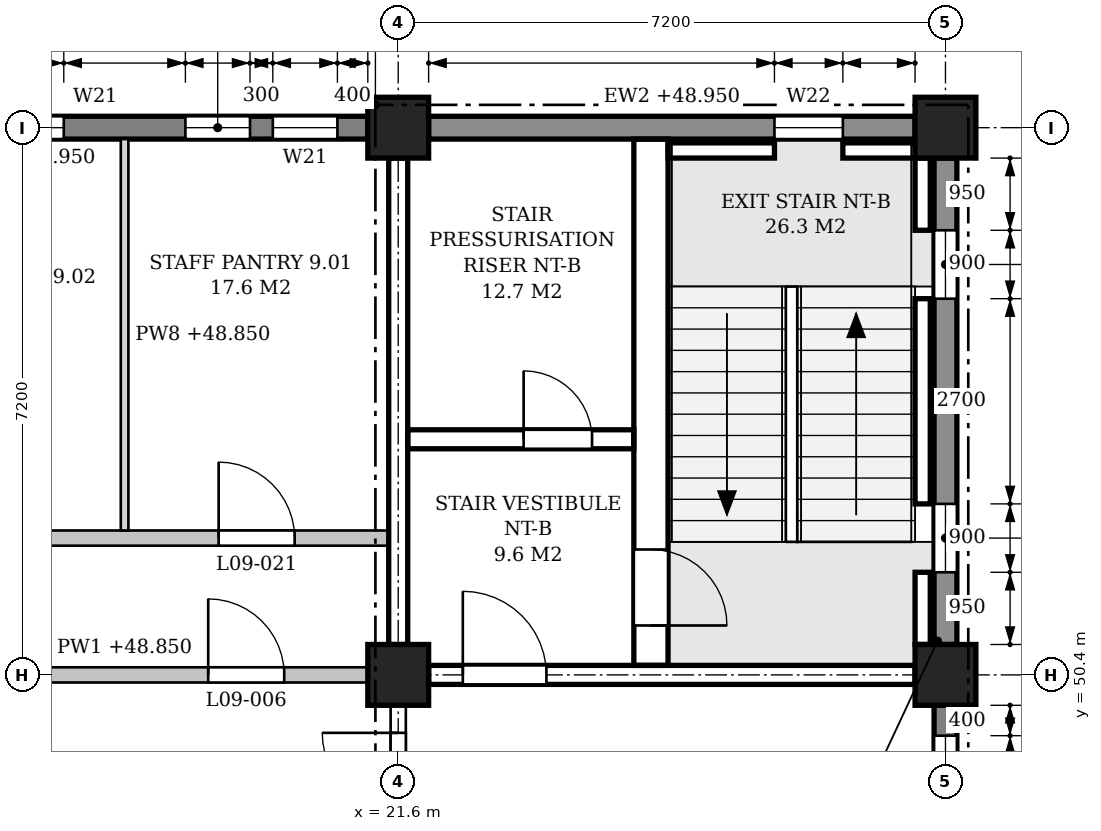
"""IFC4 building model, lengths in metres.
Left out: names, types, materials, properties, quantities, classifications, styles, units other than length and angle.
Written with IfcOpenShell. Run it as: python <this file> out.ifc"""

import sys

from ifc_helpers import new_model, si_unit, direction, frame, frame_2d, origin, origin_2d, place, context, subcontext, project, spatial, polyline, rectangle, outline, extrude, element, fill, save


model = new_model("IFC4")
c1 = context("Model", 3, precision=1e-05, world=origin(), true_north=direction((0.0, 1.0)))
c2 = subcontext(c1, "Body", "Model", "MODEL_VIEW")
j1 = project(units=[si_unit("LENGTHUNIT", "METRE"), si_unit("PLANEANGLEUNIT", "RADIAN")], contexts=[c1])
p1 = place(None, origin())
s1 = spatial("IfcSite", under=j1, at=p1, CompositionType="ELEMENT")
p2 = place(p1, origin())
s2 = spatial("IfcBuilding", under=s1, at=p2, CompositionType="ELEMENT")
p3 = place(p2, frame((0.0, 0.0, 45.3)))
s3 = spatial("IfcBuildingStorey", under=s2, at=p3, CompositionType="ELEMENT", Elevation=45.3)
for number, where, z_axis, x_axis in (
    (1, (21.6, 50.4, 0.0), (0.0, 0.0, 1.0), (1.0, 0.0, 0.0)),
    (2, (21.6, 57.6, 0.0), (0.0, 0.0, 1.0), (1.0, 0.0, 0.0)),
    (3, (28.8, 50.4, 0.0), (0.0, 0.0, 1.0), (1.0, 0.0, 0.0)),
    (4, (28.8, 57.6, 0.0), (0.0, 0.0, 1.0), (1.0, 0.0, 0.0)),
):
    element("IfcColumn", number, at=place(p3, frame(where, z_axis=z_axis, x_axis=x_axis)), inside=s3, PredefinedType="COLUMN", context=c2, shape_type="SweptSolid", body=[
        extrude(rectangle(XDim=0.8, YDim=0.8, at=origin_2d()), origin(), (0.0, 0.0, 1.0), 4.5),
    ])
p4 = place(p3, frame((28.4, 57.6, 0.0), z_axis=(0.0, 0.0, 1.0), x_axis=(-1.0, 0.0, 0.0)))
e5 = element("IfcWall", 5, at=p4, inside=s3, PredefinedType="STANDARD", context=c2, shape_type="SweptSolid", body=[
    extrude(rectangle(XDim=6.4, YDim=0.3, at=frame_2d((3.2, 0.0))), origin(), (0.0, 0.0, 1.0), 3.65),
])
p5 = place(p4, frame((0.95, 0.0, 0.9)))
e6 = element("IfcOpeningElement", 6, at=p5, cuts=e5, PredefinedType="OPENING", context=c2, shape_type="SweptSolid", body=[
    extrude(outline(polyline([(0.0, 0.0), (0.9, 0.0), (0.9, 2.25), (0.45, 2.7), (0.0, 2.25), (0.0, 0.0)])), frame((0.0, 0.16, 0.0), z_axis=(0.0, -1.0, 0.0), x_axis=(1.0, 0.0, 0.0)), (0.0, 0.0, 1.0), 0.32),
])
p6 = place(p3, frame((21.2, 57.6, 0.0), z_axis=(0.0, 0.0, 1.0), x_axis=(-1.0, 0.0, 0.0)))
e7 = element("IfcWall", 7, at=p6, inside=s3, PredefinedType="STANDARD", context=c2, shape_type="SweptSolid", body=[
    extrude(rectangle(XDim=6.4, YDim=0.3, at=frame_2d((3.2, 0.0))), origin(), (0.0, 0.0, 1.0), 3.65),
])
p7 = place(p6, frame((0.4, 0.0, 0.9)))
e8 = element("IfcOpeningElement", 8, at=p7, cuts=e7, PredefinedType="OPENING", context=c2, shape_type="SweptSolid", body=[
    extrude(outline(polyline([(0.0, 0.0), (0.85, 0.0), (0.85, 2.25), (0.425, 2.7), (0.0, 2.25), (0.0, 0.0)])), frame((0.0, 0.16, 0.0), z_axis=(0.0, -1.0, 0.0), x_axis=(1.0, 0.0, 0.0)), (0.0, 0.0, 1.0), 0.32),
])
p8 = place(p6, frame((1.55, 0.0, 0.9)))
e9 = element("IfcOpeningElement", 9, at=p8, cuts=e7, PredefinedType="OPENING", context=c2, shape_type="SweptSolid", body=[
    extrude(outline(polyline([(0.0, 0.0), (0.85, 0.0), (0.85, 2.25), (0.425, 2.7), (0.0, 2.25), (0.0, 0.0)])), frame((0.0, 0.16, 0.0), z_axis=(0.0, -1.0, 0.0), x_axis=(1.0, 0.0, 0.0)), (0.0, 0.0, 1.0), 0.32),
])
p9 = place(p6, frame((4.0, 0.0, 0.9)))
e10 = element("IfcOpeningElement", 10, at=p9, cuts=e7, PredefinedType="OPENING", context=c2, shape_type="SweptSolid", body=[
    extrude(outline(polyline([(0.0, 0.0), (0.85, 0.0), (0.85, 2.25), (0.425, 2.7), (0.0, 2.25), (0.0, 0.0)])), frame((0.0, 0.16, 0.0), z_axis=(0.0, -1.0, 0.0), x_axis=(1.0, 0.0, 0.0)), (0.0, 0.0, 1.0), 0.32),
])
p10 = place(p6, frame((5.15, 0.0, 0.9)))
e11 = element("IfcOpeningElement", 11, at=p10, cuts=e7, PredefinedType="OPENING", context=c2, shape_type="SweptSolid", body=[
    extrude(outline(polyline([(0.0, 0.0), (0.85, 0.0), (0.85, 2.25), (0.425, 2.7), (0.0, 2.25), (0.0, 0.0)])), frame((0.0, 0.16, 0.0), z_axis=(0.0, -1.0, 0.0), x_axis=(1.0, 0.0, 0.0)), (0.0, 0.0, 1.0), 0.32),
])
p11 = place(p3, frame((28.8, 43.6, 0.0), z_axis=(0.0, 0.0, 1.0), x_axis=(0.0, 1.0, 0.0)))
e12 = element("IfcWall", 12, at=p11, inside=s3, PredefinedType="STANDARD", context=c2, shape_type="SweptSolid", body=[
    extrude(rectangle(XDim=6.4, YDim=0.3, at=frame_2d((3.2, 0.0))), origin(), (0.0, 0.0, 1.0), 3.65),
])
p12 = place(p11, frame((4.0, 0.0, 0.9)))
e13 = element("IfcOpeningElement", 13, at=p12, cuts=e12, PredefinedType="OPENING", context=c2, shape_type="SweptSolid", body=[
    extrude(outline(polyline([(0.0, 0.0), (0.85, 0.0), (0.85, 2.25), (0.425, 2.7), (0.0, 2.25), (0.0, 0.0)])), frame((0.0, 0.16, 0.0), z_axis=(0.0, -1.0, 0.0), x_axis=(1.0, 0.0, 0.0)), (0.0, 0.0, 1.0), 0.32),
])
p13 = place(p11, frame((5.15, 0.0, 0.9)))
e14 = element("IfcOpeningElement", 14, at=p13, cuts=e12, PredefinedType="OPENING", context=c2, shape_type="SweptSolid", body=[
    extrude(outline(polyline([(0.0, 0.0), (0.85, 0.0), (0.85, 2.25), (0.425, 2.7), (0.0, 2.25), (0.0, 0.0)])), frame((0.0, 0.16, 0.0), z_axis=(0.0, -1.0, 0.0), x_axis=(1.0, 0.0, 0.0)), (0.0, 0.0, 1.0), 0.32),
])
p14 = place(p3, frame((28.8, 50.8, 0.0), z_axis=(0.0, 0.0, 1.0), x_axis=(0.0, 1.0, 0.0)))
e15 = element("IfcWall", 15, at=p14, inside=s3, PredefinedType="STANDARD", context=c2, shape_type="SweptSolid", body=[
    extrude(rectangle(XDim=6.4, YDim=0.3, at=frame_2d((3.2, 0.0))), origin(), (0.0, 0.0, 1.0), 3.65),
])
p15 = place(p14, frame((0.95, 0.0, 0.9)))
e16 = element("IfcOpeningElement", 16, at=p15, cuts=e15, PredefinedType="OPENING", context=c2, shape_type="SweptSolid", body=[
    extrude(outline(polyline([(0.0, 0.0), (0.9, 0.0), (0.9, 2.25), (0.45, 2.7), (0.0, 2.25), (0.0, 0.0)])), frame((0.0, 0.16, 0.0), z_axis=(0.0, -1.0, 0.0), x_axis=(1.0, 0.0, 0.0)), (0.0, 0.0, 1.0), 0.32),
])
p16 = place(p14, frame((4.55, 0.0, 0.9)))
e17 = element("IfcOpeningElement", 17, at=p16, cuts=e15, PredefinedType="OPENING", context=c2, shape_type="SweptSolid", body=[
    extrude(outline(polyline([(0.0, 0.0), (0.9, 0.0), (0.9, 2.25), (0.45, 2.7), (0.0, 2.25), (0.0, 0.0)])), frame((0.0, 0.16, 0.0), z_axis=(0.0, -1.0, 0.0), x_axis=(1.0, 0.0, 0.0)), (0.0, 0.0, 1.0), 0.32),
])
p17 = place(p3, frame((22.0, 50.4, 0.0), z_axis=(0.0, 0.0, 1.0), x_axis=(1.0, 0.0, 0.0)))
e18 = element("IfcWall", 18, at=p17, inside=s3, PredefinedType="SHEAR", context=c2, shape_type="SweptSolid", body=[
    extrude(rectangle(XDim=6.4, YDim=0.25, at=frame_2d((3.2, 0.0))), origin(), (0.0, 0.0, 1.0), 3.55),
])
p18 = place(p17, frame((0.45, 0.0, 0.0)))
e19 = element("IfcOpeningElement", 19, at=p18, cuts=e18, PredefinedType="OPENING", context=c2, shape_type="SweptSolid", body=[
    extrude(rectangle(XDim=1.1, YDim=2.1, at=frame_2d((0.55, 1.05))), frame((0.0, 0.135, 0.0), z_axis=(0.0, -1.0, 0.0), x_axis=(1.0, 0.0, 0.0)), (0.0, 0.0, 1.0), 0.27),
])
p19 = place(p3, frame((21.6, 50.8, 0.0), z_axis=(0.0, 0.0, 1.0), x_axis=(0.0, 1.0, 0.0)))
e20 = element("IfcWall", 20, at=p19, inside=s3, PredefinedType="SHEAR", context=c2, shape_type="SweptSolid", body=[
    extrude(rectangle(XDim=6.4, YDim=0.25, at=frame_2d((3.2, 0.0))), origin(), (0.0, 0.0, 1.0), 3.55),
])
p20 = place(p3, frame((28.5, 50.8, -0.25), z_axis=(0.0, 0.0, 1.0), x_axis=(0.0, 1.0, 0.0)))
e21 = element("IfcWall", 21, at=p20, inside=s3, PredefinedType="SHEAR", context=c2, shape_type="SweptSolid", body=[
    extrude(rectangle(XDim=0.95, YDim=0.2, at=frame_2d((0.475, 0.0))), origin(), (0.0, 0.0, 1.0), 4.5),
])
p21 = place(p3, frame((28.5, 52.65, -0.25), z_axis=(0.0, 0.0, 1.0), x_axis=(0.0, 1.0, 0.0)))
e22 = element("IfcWall", 22, at=p21, inside=s3, PredefinedType="SHEAR", context=c2, shape_type="SweptSolid", body=[
    extrude(rectangle(XDim=2.7, YDim=0.2, at=frame_2d((1.35, 0.0))), origin(), (0.0, 0.0, 1.0), 4.5),
])
p22 = place(p3, frame((28.5, 56.25, -0.25), z_axis=(0.0, 0.0, 1.0), x_axis=(0.0, 1.0, 0.0)))
e23 = element("IfcWall", 23, at=p22, inside=s3, PredefinedType="SHEAR", context=c2, shape_type="SweptSolid", body=[
    extrude(rectangle(XDim=0.95, YDim=0.2, at=frame_2d((0.475, 0.0))), origin(), (0.0, 0.0, 1.0), 4.5),
])
p23 = place(p3, frame((25.15, 57.3, -0.25), z_axis=(0.0, 0.0, 1.0), x_axis=(1.0, 0.0, 0.0)))
e24 = element("IfcWall", 24, at=p23, inside=s3, PredefinedType="SHEAR", context=c2, shape_type="SweptSolid", body=[
    extrude(rectangle(XDim=1.4, YDim=0.2, at=frame_2d((0.7, 0.0))), origin(), (0.0, 0.0, 1.0), 4.5),
])
p24 = place(p3, frame((27.45, 57.3, -0.25), z_axis=(0.0, 0.0, 1.0), x_axis=(1.0, 0.0, 0.0)))
e25 = element("IfcWall", 25, at=p24, inside=s3, PredefinedType="SHEAR", context=c2, shape_type="SweptSolid", body=[
    extrude(rectangle(XDim=0.95, YDim=0.2, at=frame_2d((0.475, 0.0))), origin(), (0.0, 0.0, 1.0), 4.5),
])
p25 = place(p3, frame((24.925, 50.525, 0.0), z_axis=(0.0, 0.0, 1.0), x_axis=(0.0, 1.0, 0.0)))
e26 = element("IfcWall", 26, at=p25, inside=s3, PredefinedType="SHEAR", context=c2, shape_type="SweptSolid", body=[
    extrude(rectangle(XDim=6.925, YDim=0.45, at=frame_2d((3.462, 0.0))), origin(), (0.0, 0.0, 1.0), 4.25),
])
p26 = place(p25, frame((0.525, 0.0, 0.0)))
e27 = element("IfcOpeningElement", 27, at=p26, cuts=e26, PredefinedType="OPENING", context=c2, shape_type="SweptSolid", body=[
    extrude(rectangle(XDim=1.0, YDim=2.1, at=frame_2d((0.5, 1.05))), frame((0.0, 0.235, 0.0), z_axis=(0.0, -1.0, 0.0), x_axis=(1.0, 0.0, 0.0)), (0.0, 0.0, 1.0), 0.47),
])
p27 = place(p3, frame((21.725, 53.5, 0.0), z_axis=(0.0, 0.0, 1.0), x_axis=(1.0, 0.0, 0.0)))
e28 = element("IfcWall", 28, at=p27, inside=s3, PredefinedType="SHEAR", context=c2, shape_type="SweptSolid", body=[
    extrude(rectangle(XDim=2.975, YDim=0.25, at=frame_2d((1.487, 0.0))), origin(), (0.0, 0.0, 1.0), 4.25),
])
p28 = place(p27, frame((1.525, 0.0, 0.0)))
e29 = element("IfcOpeningElement", 29, at=p28, cuts=e28, PredefinedType="OPENING", context=c2, shape_type="SweptSolid", body=[
    extrude(rectangle(XDim=0.9, YDim=2.1, at=frame_2d((0.45, 1.05))), frame((0.0, 0.135, 0.0), z_axis=(0.0, -1.0, 0.0), x_axis=(1.0, 0.0, 0.0)), (0.0, 0.0, 1.0), 0.27),
])
p29 = place(p3, frame((14.8, 50.4, 0.0), z_axis=(0.0, 0.0, 1.0), x_axis=(1.0, 0.0, 0.0)))
e30 = element("IfcWall", 30, at=p29, inside=s3, PredefinedType="PARTITIONING", context=c2, shape_type="SweptSolid", body=[
    extrude(rectangle(XDim=6.4, YDim=0.2, at=frame_2d((3.2, 0.0))), origin(), (0.0, 0.0, 1.0), 3.55),
])
p30 = place(p29, frame((4.3, 0.0, 0.0)))
e31 = element("IfcOpeningElement", 31, at=p30, cuts=e30, PredefinedType="OPENING", context=c2, shape_type="SweptSolid", body=[
    extrude(rectangle(XDim=1.0, YDim=2.1, at=frame_2d((0.5, 1.05))), frame((0.0, 0.11, 0.0), z_axis=(0.0, -1.0, 0.0), x_axis=(1.0, 0.0, 0.0)), (0.0, 0.0, 1.0), 0.22),
])
p31 = place(p3, frame((7.325, 52.2, 0.0), z_axis=(0.0, 0.0, 1.0), x_axis=(1.0, 0.0, 0.0)))
e32 = element("IfcWall", 32, at=p31, inside=s3, PredefinedType="PARTITIONING", context=c2, shape_type="SweptSolid", body=[
    extrude(outline(polyline([(0.0, 0.0), (14.15, 0.0), (14.15, 3.55), (14.05, 3.55), (14.05, 4.25), (7.3, 4.25), (7.3, 3.55), (6.85, 3.55), (6.85, 4.25), (0.1, 4.25), (0.1, 3.55), (0.0, 3.55), (0.0, 0.0)])), frame((0.0, 0.1, 0.0), z_axis=(0.0, -1.0, 0.0), x_axis=(1.0, 0.0, 0.0)), (0.0, 0.0, 1.0), 0.2),
])
p32 = place(p31, frame((1.238, 0.0, 0.0)))
e33 = element("IfcOpeningElement", 33, at=p32, cuts=e32, PredefinedType="OPENING", context=c2, shape_type="SweptSolid", body=[
    extrude(rectangle(XDim=1.0, YDim=2.1, at=frame_2d((0.5, 1.05))), frame((0.0, 0.11, 0.0), z_axis=(0.0, -1.0, 0.0), x_axis=(1.0, 0.0, 0.0)), (0.0, 0.0, 1.0), 0.22),
])
p33 = place(p31, frame((4.775, 0.0, 0.0)))
e34 = element("IfcOpeningElement", 34, at=p33, cuts=e32, PredefinedType="OPENING", context=c2, shape_type="SweptSolid", body=[
    extrude(rectangle(XDim=1.0, YDim=2.1, at=frame_2d((0.5, 1.05))), frame((0.0, 0.11, 0.0), z_axis=(0.0, -1.0, 0.0), x_axis=(1.0, 0.0, 0.0)), (0.0, 0.0, 1.0), 0.22),
])
p34 = place(p31, frame((8.375, 0.0, 0.0)))
e35 = element("IfcOpeningElement", 35, at=p34, cuts=e32, PredefinedType="OPENING", context=c2, shape_type="SweptSolid", body=[
    extrude(rectangle(XDim=1.0, YDim=2.1, at=frame_2d((0.5, 1.05))), frame((0.0, 0.11, 0.0), z_axis=(0.0, -1.0, 0.0), x_axis=(1.0, 0.0, 0.0)), (0.0, 0.0, 1.0), 0.22),
])
p35 = place(p31, frame((11.913, 0.0, 0.0)))
e36 = element("IfcOpeningElement", 36, at=p35, cuts=e32, PredefinedType="OPENING", context=c2, shape_type="SweptSolid", body=[
    extrude(rectangle(XDim=1.0, YDim=2.1, at=frame_2d((0.5, 1.05))), frame((0.0, 0.11, 0.0), z_axis=(0.0, -1.0, 0.0), x_axis=(1.0, 0.0, 0.0)), (0.0, 0.0, 1.0), 0.22),
])
p36 = place(p3, frame((18.0, 52.3, 0.0), z_axis=(0.0, 0.0, 1.0), x_axis=(0.0, 1.0, 0.0)))
e37 = element("IfcWall", 37, at=p36, inside=s3, PredefinedType="PARTITIONING", context=c2, shape_type="SweptSolid", body=[
    extrude(rectangle(XDim=5.15, YDim=0.1, at=frame_2d((2.575, 0.0))), origin(), (0.0, 0.0, 1.0), 3.55),
])
p37 = place(p3, frame((21.6, 47.275, 0.0), z_axis=(0.0, 0.0, 1.0), x_axis=(0.0, 1.0, 0.0)))
e38 = element("IfcWall", 38, at=p37, inside=s3, PredefinedType="PARTITIONING", context=c2, shape_type="SweptSolid", body=[
    extrude(rectangle(XDim=2.725, YDim=0.2, at=frame_2d((1.363, 0.0))), origin(), (0.0, 0.0, 1.0), 3.55),
])
p38 = place(p37, frame((0.363, 0.0, 0.0)))
e39 = element("IfcOpeningElement", 39, at=p38, cuts=e38, PredefinedType="OPENING", context=c2, shape_type="SweptSolid", body=[
    extrude(rectangle(XDim=2.0, YDim=2.4, at=frame_2d((1.0, 1.2))), frame((0.0, 0.11, 0.0), z_axis=(0.0, -1.0, 0.0), x_axis=(1.0, 0.0, 0.0)), (0.0, 0.0, 1.0), 0.22),
])
p39 = place(p13, origin())
e40 = element("IfcWindow", 40, at=p39, inside=s3, PartitioningType="SINGLE_PANEL", PredefinedType="WINDOW", context=c2, shape_type="SweptSolid", body=[
    extrude(outline(polyline([(0.0, 0.0), (0.85, 0.0), (0.85, 2.25), (0.425, 2.7), (0.0, 2.25), (0.0, 0.0)])), frame((0.0, 0.03, 0.0), z_axis=(0.0, -1.0, 0.0), x_axis=(1.0, 0.0, 0.0)), (0.0, 0.0, 1.0), 0.06),
])
fill(e14, e40)
p40 = place(p15, origin())
e41 = element("IfcWindow", 41, at=p40, inside=s3, PartitioningType="SINGLE_PANEL", PredefinedType="WINDOW", context=c2, shape_type="SweptSolid", body=[
    extrude(outline(polyline([(0.0, 0.0), (0.9, 0.0), (0.9, 2.25), (0.45, 2.7), (0.0, 2.25), (0.0, 0.0)])), frame((0.0, 0.03, 0.0), z_axis=(0.0, -1.0, 0.0), x_axis=(1.0, 0.0, 0.0)), (0.0, 0.0, 1.0), 0.06),
])
fill(e16, e41)
p41 = place(p16, origin())
e42 = element("IfcWindow", 42, at=p41, inside=s3, PartitioningType="SINGLE_PANEL", PredefinedType="WINDOW", context=c2, shape_type="SweptSolid", body=[
    extrude(outline(polyline([(0.0, 0.0), (0.9, 0.0), (0.9, 2.25), (0.45, 2.7), (0.0, 2.25), (0.0, 0.0)])), frame((0.0, 0.03, 0.0), z_axis=(0.0, -1.0, 0.0), x_axis=(1.0, 0.0, 0.0)), (0.0, 0.0, 1.0), 0.06),
])
fill(e17, e42)
p42 = place(p5, origin())
e43 = element("IfcWindow", 43, at=p42, inside=s3, PartitioningType="SINGLE_PANEL", PredefinedType="WINDOW", context=c2, shape_type="SweptSolid", body=[
    extrude(outline(polyline([(0.0, 0.0), (0.9, 0.0), (0.9, 2.25), (0.45, 2.7), (0.0, 2.25), (0.0, 0.0)])), frame((0.0, 0.03, 0.0), z_axis=(0.0, -1.0, 0.0), x_axis=(1.0, 0.0, 0.0)), (0.0, 0.0, 1.0), 0.06),
])
fill(e6, e43)
p43 = place(p7, origin())
e44 = element("IfcWindow", 44, at=p43, inside=s3, PartitioningType="SINGLE_PANEL", PredefinedType="WINDOW", context=c2, shape_type="SweptSolid", body=[
    extrude(outline(polyline([(0.0, 0.0), (0.85, 0.0), (0.85, 2.25), (0.425, 2.7), (0.0, 2.25), (0.0, 0.0)])), frame((0.0, 0.03, 0.0), z_axis=(0.0, -1.0, 0.0), x_axis=(1.0, 0.0, 0.0)), (0.0, 0.0, 1.0), 0.06),
])
fill(e8, e44)
p44 = place(p8, origin())
e45 = element("IfcWindow", 45, at=p44, inside=s3, PartitioningType="SINGLE_PANEL", PredefinedType="WINDOW", context=c2, shape_type="SweptSolid", body=[
    extrude(outline(polyline([(0.0, 0.0), (0.85, 0.0), (0.85, 2.25), (0.425, 2.7), (0.0, 2.25), (0.0, 0.0)])), frame((0.0, 0.03, 0.0), z_axis=(0.0, -1.0, 0.0), x_axis=(1.0, 0.0, 0.0)), (0.0, 0.0, 1.0), 0.06),
])
fill(e9, e45)
p45 = place(p9, origin())
e46 = element("IfcWindow", 46, at=p45, inside=s3, PartitioningType="SINGLE_PANEL", PredefinedType="WINDOW", context=c2, shape_type="SweptSolid", body=[
    extrude(outline(polyline([(0.0, 0.0), (0.85, 0.0), (0.85, 2.25), (0.425, 2.7), (0.0, 2.25), (0.0, 0.0)])), frame((0.0, 0.03, 0.0), z_axis=(0.0, -1.0, 0.0), x_axis=(1.0, 0.0, 0.0)), (0.0, 0.0, 1.0), 0.06),
])
fill(e10, e46)
p46 = place(p26, frame((1.0, 0.0, 0.0), z_axis=(0.0, 0.0, 1.0), x_axis=(-1.0, 0.0, 0.0)))
e47 = element("IfcDoor", 47, at=p46, inside=s3, OperationType="SINGLE_SWING_RIGHT", PredefinedType="DOOR", context=c2, shape_type="SweptSolid", body=[
    extrude(rectangle(XDim=1.0, YDim=2.1, at=frame_2d((0.5, 1.05))), frame((0.0, 0.025, 0.0), z_axis=(0.0, -1.0, 0.0), x_axis=(1.0, 0.0, 0.0)), (0.0, 0.0, 1.0), 0.05),
])
fill(e27, e47)
p47 = place(p18, origin())
e48 = element("IfcDoor", 48, at=p47, inside=s3, OperationType="SINGLE_SWING_LEFT", PredefinedType="DOOR", context=c2, shape_type="SweptSolid", body=[
    extrude(rectangle(XDim=1.1, YDim=2.1, at=frame_2d((0.55, 1.05))), frame((0.0, 0.025, 0.0), z_axis=(0.0, -1.0, 0.0), x_axis=(1.0, 0.0, 0.0)), (0.0, 0.0, 1.0), 0.05),
])
fill(e19, e48)
p48 = place(p28, origin())
e49 = element("IfcDoor", 49, at=p48, inside=s3, OperationType="SINGLE_SWING_LEFT", PredefinedType="DOOR", context=c2, shape_type="SweptSolid", body=[
    extrude(rectangle(XDim=0.9, YDim=2.1, at=frame_2d((0.45, 1.05))), frame((0.0, 0.025, 0.0), z_axis=(0.0, -1.0, 0.0), x_axis=(1.0, 0.0, 0.0)), (0.0, 0.0, 1.0), 0.05),
])
fill(e29, e49)
p49 = place(p38, origin())
e50 = element("IfcDoor", 50, at=p49, inside=s3, OperationType="DOUBLE_DOOR_SINGLE_SWING", PredefinedType="DOOR", context=c2, shape_type="SweptSolid", body=[
    extrude(rectangle(XDim=2.0, YDim=2.4, at=frame_2d((1.0, 1.2))), frame((0.0, 0.025, 0.0), z_axis=(0.0, -1.0, 0.0), x_axis=(1.0, 0.0, 0.0)), (0.0, 0.0, 1.0), 0.05),
])
fill(e39, e50)
p50 = place(p30, origin())
e51 = element("IfcDoor", 51, at=p50, inside=s3, OperationType="SINGLE_SWING_LEFT", PredefinedType="DOOR", context=c2, shape_type="SweptSolid", body=[
    extrude(rectangle(XDim=1.0, YDim=2.1, at=frame_2d((0.5, 1.05))), frame((0.0, 0.025, 0.0), z_axis=(0.0, -1.0, 0.0), x_axis=(1.0, 0.0, 0.0)), (0.0, 0.0, 1.0), 0.05),
])
fill(e31, e51)
p51 = place(p35, origin())
e52 = element("IfcDoor", 52, at=p51, inside=s3, OperationType="SINGLE_SWING_LEFT", PredefinedType="DOOR", context=c2, shape_type="SweptSolid", body=[
    extrude(rectangle(XDim=1.0, YDim=2.1, at=frame_2d((0.5, 1.05))), frame((0.0, 0.025, 0.0), z_axis=(0.0, -1.0, 0.0), x_axis=(1.0, 0.0, 0.0)), (0.0, 0.0, 1.0), 0.05),
])
fill(e36, e52)
save(model, sys.argv[1])
